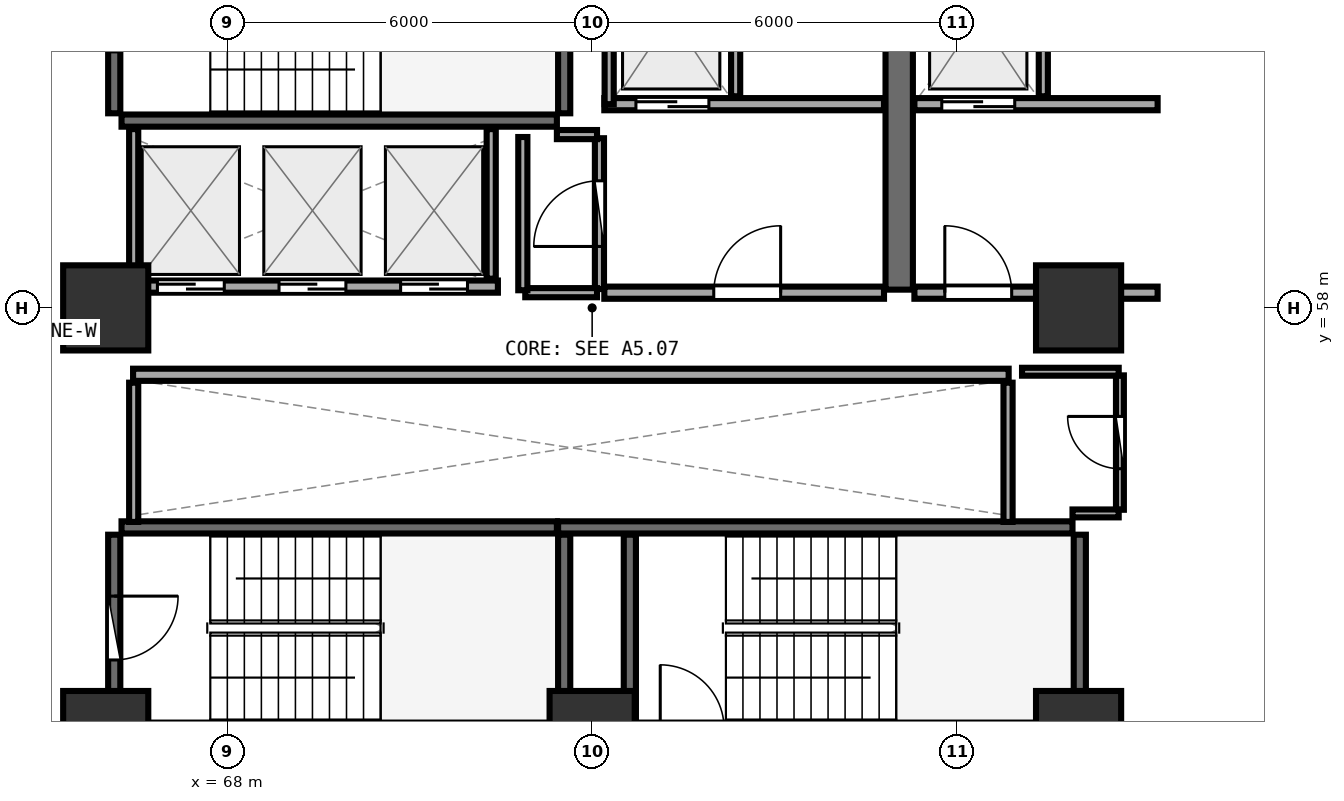
"""IFC4 building model, lengths in metres.
Left out: names, types, materials, properties, quantities, classifications, styles, units other than length and angle.
Written with IfcOpenShell. Run it as: python <this file> out.ifc"""

import sys

from ifc_helpers import new_model, si_unit, direction, frame, frame_2d, origin, origin_2d, place, context, subcontext, project, spatial, rectangle, extrude, element, fill, save


model = new_model("IFC4")
c1 = context("Model", 3, precision=1e-05, world=origin(), true_north=direction((0.0, 1.0)))
c2 = subcontext(c1, "Body", "Model", "MODEL_VIEW")
j1 = project(units=[si_unit("LENGTHUNIT", "METRE"), si_unit("PLANEANGLEUNIT", "RADIAN")], contexts=[c1])
p1 = place(None, origin())
s1 = spatial("IfcSite", under=j1, at=p1, CompositionType="ELEMENT")
p2 = place(p1, origin())
s2 = spatial("IfcBuilding", under=s1, at=p2, CompositionType="ELEMENT")
p3 = place(p2, frame((0.0, 0.0, 83.85)))
s3 = spatial("IfcBuildingStorey", under=s2, at=p3, CompositionType="ELEMENT", Elevation=83.85)
for number, where, z_axis, x_axis in (
    (1, (66.0, 51.0, 0.0), (0.0, 0.0, 1.0), (1.0, 0.0, 0.0)),
    (2, (74.0, 51.0, 0.0), (0.0, 0.0, 1.0), (1.0, 0.0, 0.0)),
    (3, (82.0, 51.0, 0.0), (0.0, 0.0, 1.0), (1.0, 0.0, 0.0)),
    (4, (82.0, 58.0, 0.0), (0.0, 0.0, 1.0), (1.0, 0.0, 0.0)),
    (5, (66.0, 58.0, 0.0), (0.0, 0.0, 1.0), (1.0, 0.0, 0.0)),
):
    element("IfcColumn", number, at=place(p3, frame(where, z_axis=z_axis, x_axis=x_axis)), inside=s3, PredefinedType="PILASTER", context=c2, shape_type="SweptSolid", body=[
        extrude(rectangle(XDim=1.4, YDim=1.4, at=origin_2d()), origin(), (0.0, 0.0, 1.0), 3.75),
    ])
p4 = place(p3, frame((66.26, 61.08, 0.0), z_axis=(0.0, 0.0, 1.0), x_axis=(1.0, 0.0, 0.0)))
e6 = element("IfcWall", 6, at=p4, inside=s3, PredefinedType="SHEAR", context=c2, shape_type="SweptSolid", body=[
    extrude(rectangle(XDim=7.16, YDim=0.2, at=frame_2d((3.58, 0.0))), origin(), (0.0, 0.0, 1.0), 3.49),
])
p5 = place(p3, frame((73.54, 61.2, 0.0), z_axis=(0.0, 0.0, 1.0), x_axis=(0.0, 1.0, 0.0)))
e7 = element("IfcWall", 7, at=p5, inside=s3, PredefinedType="SHEAR", context=c2, shape_type="SweptSolid", body=[
    extrude(rectangle(XDim=3.07, YDim=0.2, at=frame_2d((1.535, 0.0))), origin(), (0.0, 0.0, 1.0), 3.49),
])
p6 = place(p3, frame((66.14, 64.27, 0.0), z_axis=(0.0, 0.0, 1.0), x_axis=(0.0, -1.0, 0.0)))
e8 = element("IfcWall", 8, at=p6, inside=s3, PredefinedType="SHEAR", context=c2, shape_type="SweptSolid", body=[
    extrude(rectangle(XDim=3.07, YDim=0.2, at=frame_2d((1.535, 0.0))), origin(), (0.0, 0.0, 1.0), 3.49),
])
p7 = place(p6, frame((1.01, 0.0, 0.0)))
e9 = element("IfcOpeningElement", 9, at=p7, cuts=e8, PredefinedType="OPENING", context=c2, shape_type="SweptSolid", body=[
    extrude(rectangle(XDim=1.05, YDim=2.1, at=frame_2d((0.525, 1.05))), frame((0.0, 0.11, 0.0), z_axis=(0.0, -1.0, 0.0), x_axis=(1.0, 0.0, 0.0)), (0.0, 0.0, 1.0), 0.22),
])
p8 = place(p3, frame((82.02, 51.2, 0.0), z_axis=(0.0, 0.0, 1.0), x_axis=(0.0, 1.0, 0.0)))
e10 = element("IfcWall", 10, at=p8, inside=s3, PredefinedType="SHEAR", context=c2, shape_type="SweptSolid", body=[
    extrude(rectangle(XDim=3.07, YDim=0.2, at=frame_2d((1.535, 0.0))), origin(), (0.0, 0.0, 1.0), 3.49),
])
p9 = place(p3, frame((81.9, 54.39, 0.0), z_axis=(0.0, 0.0, 1.0), x_axis=(-1.0, 0.0, 0.0)))
e11 = element("IfcWall", 11, at=p9, inside=s3, PredefinedType="SHEAR", context=c2, shape_type="SweptSolid", body=[
    extrude(rectangle(XDim=8.46, YDim=0.2, at=frame_2d((4.23, 0.0))), origin(), (0.0, 0.0, 1.0), 3.49),
])
for number, where, z_axis, x_axis in (
    (12, (74.62, 54.27, 0.0), (0.0, 0.0, 1.0), (0.0, -1.0, 0.0)),
    (13, (73.54, 51.2, 0.0), (0.0, 0.0, 1.0), (0.0, 1.0, 0.0)),
):
    element("IfcWall", number, at=place(p3, frame(where, z_axis=z_axis, x_axis=x_axis)), inside=s3, PredefinedType="SHEAR", context=c2, shape_type="SweptSolid", body=[
        extrude(rectangle(XDim=3.07, YDim=0.2, at=frame_2d((1.535, 0.0))), origin(), (0.0, 0.0, 1.0), 3.49),
    ])
p10 = place(p3, frame((73.42, 54.39, 0.0), z_axis=(0.0, 0.0, 1.0), x_axis=(-1.0, 0.0, 0.0)))
e14 = element("IfcWall", 14, at=p10, inside=s3, PredefinedType="SHEAR", context=c2, shape_type="SweptSolid", body=[
    extrude(rectangle(XDim=7.16, YDim=0.2, at=frame_2d((3.58, 0.0))), origin(), (0.0, 0.0, 1.0), 3.49),
])
p11 = place(p3, frame((66.14, 54.27, 0.0), z_axis=(0.0, 0.0, 1.0), x_axis=(0.0, -1.0, 0.0)))
e15 = element("IfcWall", 15, at=p11, inside=s3, PredefinedType="SHEAR", context=c2, shape_type="SweptSolid", body=[
    extrude(rectangle(XDim=3.07, YDim=0.2, at=frame_2d((1.535, 0.0))), origin(), (0.0, 0.0, 1.0), 3.49),
])
p12 = place(p11, frame((1.01, 0.0, 0.0)))
e16 = element("IfcOpeningElement", 16, at=p12, cuts=e15, PredefinedType="OPENING", context=c2, shape_type="SweptSolid", body=[
    extrude(rectangle(XDim=1.05, YDim=2.1, at=frame_2d((0.525, 1.05))), frame((0.0, 0.11, 0.0), z_axis=(0.0, -1.0, 0.0), x_axis=(1.0, 0.0, 0.0)), (0.0, 0.0, 1.0), 0.22),
])
p13 = place(p3, frame((79.05, 58.3, 0.0), z_axis=(0.0, 0.0, 1.0), x_axis=(0.0, 1.0, 0.0)))
e17 = element("IfcWall", 17, at=p13, inside=s3, PredefinedType="SHEAR", context=c2, shape_type="SweptSolid", body=[
    extrude(rectangle(XDim=6.3, YDim=0.45, at=frame_2d((3.15, 0.0))), origin(), (0.0, 0.0, 1.0), 3.49),
])
p14 = place(p3, frame((74.2, 61.35, 0.0), z_axis=(0.0, 0.0, 1.0), x_axis=(1.0, 0.0, 0.0)))
e18 = element("IfcWall", 18, at=p14, inside=s3, PredefinedType="SOLIDWALL", context=c2, shape_type="SweptSolid", body=[
    extrude(rectangle(XDim=4.6, YDim=0.2, at=frame_2d((2.3, 0.0))), origin(), (0.0, 0.0, 1.0), 3.48),
])
p15 = place(p14, frame((0.52, 0.0, 0.0)))
e19 = element("IfcOpeningElement", 19, at=p15, cuts=e18, PredefinedType="OPENING", context=c2, shape_type="SweptSolid", body=[
    extrude(rectangle(XDim=1.2, YDim=2.15, at=frame_2d((0.6, 1.075))), frame((0.0, 0.11, 0.0), z_axis=(0.0, -1.0, 0.0), x_axis=(1.0, 0.0, 0.0)), (0.0, 0.0, 1.0), 0.22),
])
p16 = place(p3, frame((74.28, 61.35, 0.0), z_axis=(0.0, 0.0, 1.0), x_axis=(0.0, 1.0, 0.0)))
e20 = element("IfcWall", 20, at=p16, inside=s3, PredefinedType="PARTITIONING", context=c2, shape_type="SweptSolid", body=[
    extrude(rectangle(XDim=2.97, YDim=0.15, at=frame_2d((1.485, 0.0))), origin(), (0.0, 0.0, 1.0), 3.48),
])
p17 = place(p3, frame((76.36, 61.48, 0.0), z_axis=(0.0, 0.0, 1.0), x_axis=(0.0, 1.0, 0.0)))
e21 = element("IfcWall", 21, at=p17, inside=s3, PredefinedType="PARTITIONING", context=c2, shape_type="SweptSolid", body=[
    extrude(rectangle(XDim=2.84, YDim=0.15, at=frame_2d((1.42, 0.0))), origin(), (0.0, 0.0, 1.0), 3.48),
])
p18 = place(p3, frame((79.3, 61.35, 0.0), z_axis=(0.0, 0.0, 1.0), x_axis=(1.0, 0.0, 0.0)))
e22 = element("IfcWall", 22, at=p18, inside=s3, PredefinedType="SOLIDWALL", context=c2, shape_type="SweptSolid", body=[
    extrude(rectangle(XDim=4.0, YDim=0.2, at=frame_2d((2.0, 0.0))), origin(), (0.0, 0.0, 1.0), 2.775),
])
p19 = place(p18, frame((0.45, 0.0, 0.0)))
e23 = element("IfcOpeningElement", 23, at=p19, cuts=e22, PredefinedType="OPENING", context=c2, shape_type="SweptSolid", body=[
    extrude(rectangle(XDim=1.2, YDim=2.15, at=frame_2d((0.6, 1.075))), frame((0.0, 0.11, 0.0), z_axis=(0.0, -1.0, 0.0), x_axis=(1.0, 0.0, 0.0)), (0.0, 0.0, 1.0), 0.22),
])
p20 = place(p3, frame((81.42, 61.48, 0.0), z_axis=(0.0, 0.0, 1.0), x_axis=(0.0, 1.0, 0.0)))
e24 = element("IfcWall", 24, at=p20, inside=s3, PredefinedType="PARTITIONING", context=c2, shape_type="SweptSolid", body=[
    extrude(rectangle(XDim=2.84, YDim=0.15, at=frame_2d((1.42, 0.0))), origin(), (0.0, 0.0, 1.0), 3.48),
])
p21 = place(p3, frame((74.2, 58.25, 0.0), z_axis=(0.0, 0.0, 1.0), x_axis=(1.0, 0.0, 0.0)))
e25 = element("IfcWall", 25, at=p21, inside=s3, PredefinedType="SOLIDWALL", context=c2, shape_type="SweptSolid", body=[
    extrude(rectangle(XDim=4.6, YDim=0.2, at=frame_2d((2.3, 0.0))), origin(), (0.0, 0.0, 1.0), 3.48),
])
p22 = place(p21, frame((1.8, 0.0, 0.0)))
e26 = element("IfcOpeningElement", 26, at=p22, cuts=e25, PredefinedType="OPENING", context=c2, shape_type="SweptSolid", body=[
    extrude(rectangle(XDim=1.1, YDim=2.1, at=frame_2d((0.55, 1.05))), frame((0.0, 0.11, 0.0), z_axis=(0.0, -1.0, 0.0), x_axis=(1.0, 0.0, 0.0)), (0.0, 0.0, 1.0), 0.22),
])
p23 = place(p3, frame((79.3, 58.25, 0.0), z_axis=(0.0, 0.0, 1.0), x_axis=(1.0, 0.0, 0.0)))
e27 = element("IfcWall", 27, at=p23, inside=s3, PredefinedType="SOLIDWALL", context=c2, shape_type="SweptSolid", body=[
    extrude(rectangle(XDim=4.0, YDim=0.2, at=frame_2d((2.0, 0.0))), origin(), (0.0, 0.0, 1.0), 2.775),
])
p24 = place(p23, frame((0.5, 0.0, 0.0)))
e28 = element("IfcOpeningElement", 28, at=p24, cuts=e27, PredefinedType="OPENING", context=c2, shape_type="SweptSolid", body=[
    extrude(rectangle(XDim=1.1, YDim=2.1, at=frame_2d((0.55, 1.05))), frame((0.0, 0.11, 0.0), z_axis=(0.0, -1.0, 0.0), x_axis=(1.0, 0.0, 0.0)), (0.0, 0.0, 1.0), 0.22),
])
p25 = place(p3, frame((66.45, 58.35, 0.0), z_axis=(0.0, 0.0, 1.0), x_axis=(1.0, 0.0, 0.0)))
e29 = element("IfcWall", 29, at=p25, inside=s3, PredefinedType="SOLIDWALL", context=c2, shape_type="SweptSolid", body=[
    extrude(rectangle(XDim=6.0, YDim=0.2, at=frame_2d((3.0, 0.0))), origin(), (0.0, 0.0, 1.0), 3.48),
])
p26 = place(p25, frame((0.4, 0.0, 0.0)))
e30 = element("IfcOpeningElement", 30, at=p26, cuts=e29, PredefinedType="OPENING", context=c2, shape_type="SweptSolid", body=[
    extrude(rectangle(XDim=1.1, YDim=2.1, at=frame_2d((0.55, 1.05))), frame((0.0, 0.11, 0.0), z_axis=(0.0, -1.0, 0.0), x_axis=(1.0, 0.0, 0.0)), (0.0, 0.0, 1.0), 0.22),
])
p27 = place(p25, frame((2.4, 0.0, 0.0)))
e31 = element("IfcOpeningElement", 31, at=p27, cuts=e29, PredefinedType="OPENING", context=c2, shape_type="SweptSolid", body=[
    extrude(rectangle(XDim=1.1, YDim=2.1, at=frame_2d((0.55, 1.05))), frame((0.0, 0.11, 0.0), z_axis=(0.0, -1.0, 0.0), x_axis=(1.0, 0.0, 0.0)), (0.0, 0.0, 1.0), 0.22),
])
p28 = place(p25, frame((4.4, 0.0, 0.0)))
e32 = element("IfcOpeningElement", 32, at=p28, cuts=e29, PredefinedType="OPENING", context=c2, shape_type="SweptSolid", body=[
    extrude(rectangle(XDim=1.1, YDim=2.1, at=frame_2d((0.55, 1.05))), frame((0.0, 0.11, 0.0), z_axis=(0.0, -1.0, 0.0), x_axis=(1.0, 0.0, 0.0)), (0.0, 0.0, 1.0), 0.22),
])
for number, where, z_axis, x_axis in (
    (33, (66.46, 58.48, 0.0), (0.0, 0.0, 1.0), (0.0, 1.0, 0.0)),
    (34, (72.34, 58.48, 0.0), (0.0, 0.0, 1.0), (0.0, 1.0, 0.0)),
):
    element("IfcWall", number, at=place(p3, frame(where, z_axis=z_axis, x_axis=x_axis)), inside=s3, PredefinedType="PARTITIONING", context=c2, shape_type="SweptSolid", body=[
        extrude(rectangle(XDim=2.46, YDim=0.15, at=frame_2d((1.23, 0.0))), origin(), (0.0, 0.0, 1.0), 3.48),
    ])
p29 = place(p3, frame((66.45, 56.9, 0.0), z_axis=(0.0, 0.0, 1.0), x_axis=(1.0, 0.0, 0.0)))
e35 = element("IfcWall", 35, at=p29, inside=s3, PredefinedType="SOLIDWALL", context=c2, shape_type="SweptSolid", body=[
    extrude(rectangle(XDim=14.4, YDim=0.2, at=frame_2d((7.2, 0.0))), origin(), (0.0, 0.0, 1.0), 3.48),
])
for number, where, z_axis, x_axis in (
    (36, (66.46, 54.48, 0.0), (0.0, 0.0, 1.0), (0.0, 1.0, 0.0)),
    (37, (80.84, 54.48, 0.0), (0.0, 0.0, 1.0), (0.0, 1.0, 0.0)),
):
    element("IfcWall", number, at=place(p3, frame(where, z_axis=z_axis, x_axis=x_axis)), inside=s3, PredefinedType="PARTITIONING", context=c2, shape_type="SweptSolid", body=[
        extrude(rectangle(XDim=2.29, YDim=0.15, at=frame_2d((1.145, 0.0))), origin(), (0.0, 0.0, 1.0), 3.48),
    ])
p30 = place(p3, frame((74.12, 58.31, 0.0), z_axis=(0.0, 0.0, 1.0), x_axis=(0.0, 1.0, 0.0)))
e38 = element("IfcWall", 38, at=p30, inside=s3, PredefinedType="PARTITIONING", context=c2, shape_type="SweptSolid", body=[
    extrude(rectangle(XDim=2.48, YDim=0.15, at=frame_2d((1.24, 0.0))), origin(), (0.0, 0.0, 1.0), 3.48),
])
p31 = place(p30, frame((0.7, 0.0, 0.0)))
e39 = element("IfcOpeningElement", 39, at=p31, cuts=e38, PredefinedType="OPENING", context=c2, shape_type="SweptSolid", body=[
    extrude(rectangle(XDim=1.08, YDim=2.1, at=frame_2d((0.54, 1.05))), frame((0.0, 0.085, 0.0), z_axis=(0.0, -1.0, 0.0), x_axis=(1.0, 0.0, 0.0)), (0.0, 0.0, 1.0), 0.17),
])
p32 = place(p3, frame((82.68, 54.68, 0.0), z_axis=(0.0, 0.0, 1.0), x_axis=(0.0, 1.0, 0.0)))
e40 = element("IfcWall", 40, at=p32, inside=s3, PredefinedType="PLUMBINGWALL", context=c2, shape_type="SweptSolid", body=[
    extrude(rectangle(XDim=2.21, YDim=0.13, at=frame_2d((1.105, 0.0))), origin(), (0.0, 0.0, 1.0), 3.48),
])
p33 = place(p32, frame((0.675, 0.0, 0.0)))
e41 = element("IfcOpeningElement", 41, at=p33, cuts=e40, PredefinedType="OPENING", context=c2, shape_type="SweptSolid", body=[
    extrude(rectangle(XDim=0.86, YDim=2.05, at=frame_2d((0.43, 1.025))), frame((0.0, 0.075, 0.0), z_axis=(0.0, -1.0, 0.0), x_axis=(1.0, 0.0, 0.0)), (0.0, 0.0, 1.0), 0.15),
])
p34 = place(p3, frame((72.9, 58.25, 0.0), z_axis=(0.0, 0.0, 1.0), x_axis=(1.0, 0.0, 0.0)))
e42 = element("IfcWall", 42, at=p34, inside=s3, PredefinedType="PARTITIONING", context=c2, shape_type="SweptSolid", body=[
    extrude(rectangle(XDim=1.18, YDim=0.15, at=frame_2d((0.59, 0.0))), origin(), (0.0, 0.0, 1.0), 3.48),
])
p35 = place(p3, frame((74.08, 60.85, 0.0), z_axis=(0.0, 0.0, 1.0), x_axis=(-1.0, 0.0, 0.0)))
e43 = element("IfcWall", 43, at=p35, inside=s3, PredefinedType="PARTITIONING", context=c2, shape_type="SweptSolid", body=[
    extrude(rectangle(XDim=0.66, YDim=0.15, at=frame_2d((0.33, 0.0))), origin(), (0.0, 0.0, 1.0), 3.48),
])
p36 = place(p3, frame((72.86, 60.81, 0.0), z_axis=(0.0, 0.0, 1.0), x_axis=(0.0, -1.0, 0.0)))
e44 = element("IfcWall", 44, at=p36, inside=s3, PredefinedType="PARTITIONING", context=c2, shape_type="SweptSolid", body=[
    extrude(rectangle(XDim=2.52, YDim=0.15, at=frame_2d((1.26, 0.0))), origin(), (0.0, 0.0, 1.0), 3.48),
])
p37 = place(p3, frame((81.9, 54.62, 0.0), z_axis=(0.0, 0.0, 1.0), x_axis=(1.0, 0.0, 0.0)))
e45 = element("IfcWall", 45, at=p37, inside=s3, PredefinedType="PLUMBINGWALL", context=c2, shape_type="SweptSolid", body=[
    extrude(rectangle(XDim=0.76, YDim=0.13, at=frame_2d((0.38, 0.0))), origin(), (0.0, 0.0, 1.0), 2.775),
])
p38 = place(p3, frame((82.66, 56.95, 0.0), z_axis=(0.0, 0.0, 1.0), x_axis=(-1.0, 0.0, 0.0)))
e46 = element("IfcWall", 46, at=p38, inside=s3, PredefinedType="PLUMBINGWALL", context=c2, shape_type="SweptSolid", body=[
    extrude(rectangle(XDim=1.59, YDim=0.13, at=frame_2d((0.795, 0.0))), origin(), (0.0, 0.0, 1.0), 2.775),
])
p39 = place(p12, origin())
e47 = element("IfcDoor", 47, at=p39, inside=s3, OperationType="SINGLE_SWING_LEFT", PredefinedType="DOOR", context=c2, shape_type="SweptSolid", body=[
    extrude(rectangle(XDim=1.05, YDim=2.1, at=frame_2d((0.525, 1.05))), frame((0.0, 0.025, 0.0), z_axis=(0.0, -1.0, 0.0), x_axis=(1.0, 0.0, 0.0)), (0.0, 0.0, 1.0), 0.05),
])
fill(e16, e47)
p40 = place(p15, origin())
e48 = element("IfcDoor", 48, at=p40, inside=s3, OperationType="DOUBLE_DOOR_SLIDING", PredefinedType="DOOR", context=c2, shape_type="SweptSolid", body=[
    extrude(rectangle(XDim=1.2, YDim=2.15, at=frame_2d((0.6, 1.075))), frame((0.0, 0.025, 0.0), z_axis=(0.0, -1.0, 0.0), x_axis=(1.0, 0.0, 0.0)), (0.0, 0.0, 1.0), 0.05),
])
fill(e19, e48)
p41 = place(p19, origin())
e49 = element("IfcDoor", 49, at=p41, inside=s3, OperationType="DOUBLE_DOOR_SLIDING", PredefinedType="DOOR", context=c2, shape_type="SweptSolid", body=[
    extrude(rectangle(XDim=1.2, YDim=2.15, at=frame_2d((0.6, 1.075))), frame((0.0, 0.025, 0.0), z_axis=(0.0, -1.0, 0.0), x_axis=(1.0, 0.0, 0.0)), (0.0, 0.0, 1.0), 0.05),
])
fill(e23, e49)
p42 = place(p22, frame((1.1, 0.0, 0.0), z_axis=(0.0, 0.0, 1.0), x_axis=(-1.0, 0.0, 0.0)))
e50 = element("IfcDoor", 50, at=p42, inside=s3, OperationType="SINGLE_SWING_LEFT", PredefinedType="DOOR", context=c2, shape_type="SweptSolid", body=[
    extrude(rectangle(XDim=1.1, YDim=2.1, at=frame_2d((0.55, 1.05))), frame((0.0, 0.025, 0.0), z_axis=(0.0, -1.0, 0.0), x_axis=(1.0, 0.0, 0.0)), (0.0, 0.0, 1.0), 0.05),
])
fill(e26, e50)
p43 = place(p24, frame((1.1, 0.0, 0.0), z_axis=(0.0, 0.0, 1.0), x_axis=(-1.0, 0.0, 0.0)))
e51 = element("IfcDoor", 51, at=p43, inside=s3, OperationType="SINGLE_SWING_RIGHT", PredefinedType="DOOR", context=c2, shape_type="SweptSolid", body=[
    extrude(rectangle(XDim=1.1, YDim=2.1, at=frame_2d((0.55, 1.05))), frame((0.0, 0.025, 0.0), z_axis=(0.0, -1.0, 0.0), x_axis=(1.0, 0.0, 0.0)), (0.0, 0.0, 1.0), 0.05),
])
fill(e28, e51)
p44 = place(p26, origin())
e52 = element("IfcDoor", 52, at=p44, inside=s3, OperationType="DOUBLE_DOOR_SLIDING", PredefinedType="DOOR", context=c2, shape_type="SweptSolid", body=[
    extrude(rectangle(XDim=1.1, YDim=2.1, at=frame_2d((0.55, 1.05))), frame((0.0, 0.025, 0.0), z_axis=(0.0, -1.0, 0.0), x_axis=(1.0, 0.0, 0.0)), (0.0, 0.0, 1.0), 0.05),
])
fill(e30, e52)
p45 = place(p27, origin())
e53 = element("IfcDoor", 53, at=p45, inside=s3, OperationType="DOUBLE_DOOR_SLIDING", PredefinedType="DOOR", context=c2, shape_type="SweptSolid", body=[
    extrude(rectangle(XDim=1.1, YDim=2.1, at=frame_2d((0.55, 1.05))), frame((0.0, 0.025, 0.0), z_axis=(0.0, -1.0, 0.0), x_axis=(1.0, 0.0, 0.0)), (0.0, 0.0, 1.0), 0.05),
])
fill(e31, e53)
p46 = place(p28, origin())
e54 = element("IfcDoor", 54, at=p46, inside=s3, OperationType="DOUBLE_DOOR_SLIDING", PredefinedType="DOOR", context=c2, shape_type="SweptSolid", body=[
    extrude(rectangle(XDim=1.1, YDim=2.1, at=frame_2d((0.55, 1.05))), frame((0.0, 0.025, 0.0), z_axis=(0.0, -1.0, 0.0), x_axis=(1.0, 0.0, 0.0)), (0.0, 0.0, 1.0), 0.05),
])
fill(e32, e54)
p47 = place(p31, origin())
e55 = element("IfcDoor", 55, at=p47, inside=s3, OperationType="SINGLE_SWING_LEFT", PredefinedType="DOOR", context=c2, shape_type="SweptSolid", body=[
    extrude(rectangle(XDim=1.08, YDim=2.1, at=frame_2d((0.54, 1.05))), frame((0.0, 0.025, 0.0), z_axis=(0.0, -1.0, 0.0), x_axis=(1.0, 0.0, 0.0)), (0.0, 0.0, 1.0), 0.05),
])
fill(e39, e55)
p48 = place(p33, origin())
e56 = element("IfcDoor", 56, at=p48, inside=s3, OperationType="SINGLE_SWING_RIGHT", PredefinedType="DOOR", context=c2, shape_type="SweptSolid", body=[
    extrude(rectangle(XDim=0.86, YDim=2.05, at=frame_2d((0.43, 1.025))), frame((0.0, 0.025, 0.0), z_axis=(0.0, -1.0, 0.0), x_axis=(1.0, 0.0, 0.0)), (0.0, 0.0, 1.0), 0.05),
])
fill(e41, e56)
save(model, sys.argv[1])
